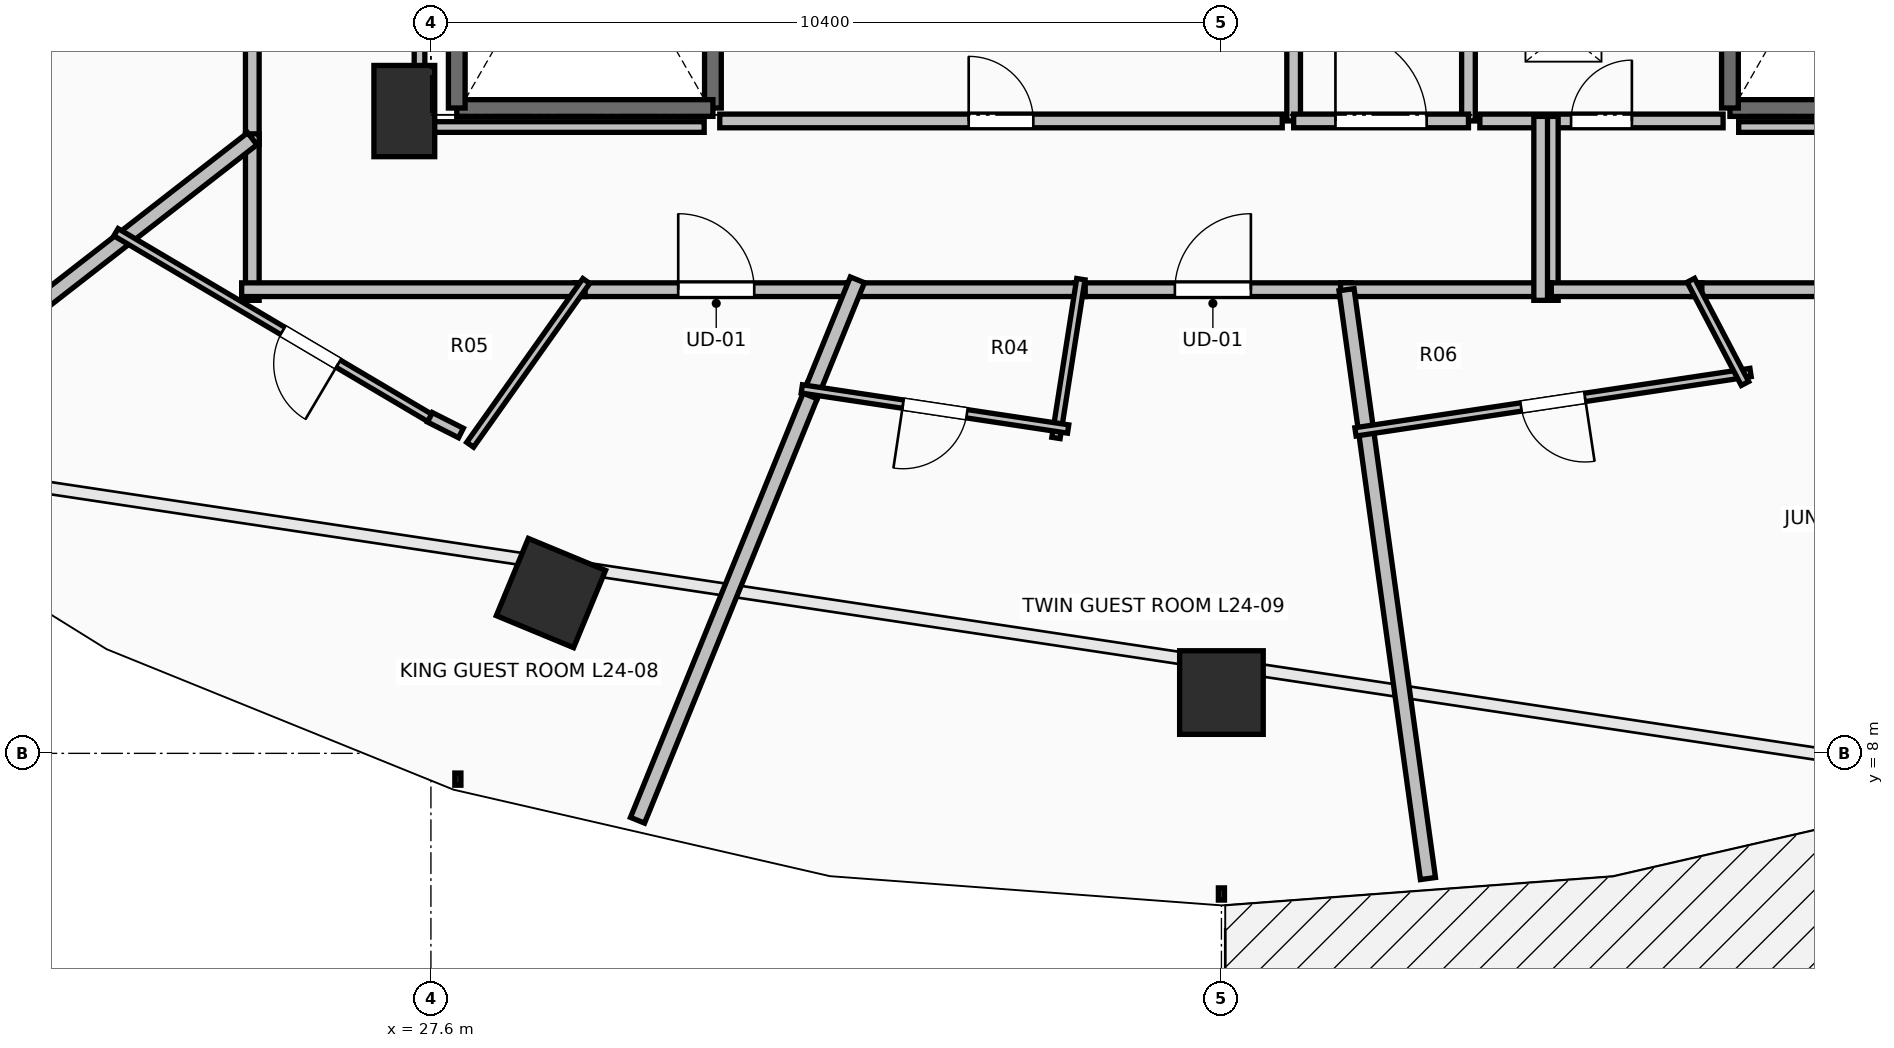
"""IFC4 building model, lengths in metres.
Left out: names, types, materials, properties, quantities, classifications, styles, units other than length and angle.
Written with IfcOpenShell. Run it as: python <this file> out.ifc"""

import sys

from ifc_helpers import new_model, si_unit, direction, frame, frame_2d, origin, origin_2d, place, context, subcontext, project, spatial, rectangle, extrude, element, fill, save


model = new_model("IFC4")
c1 = context("Model", 3, precision=1e-05, world=origin(), true_north=direction((0.0, 1.0)))
c2 = subcontext(c1, "Body", "Model", "MODEL_VIEW")
j1 = project(units=[si_unit("LENGTHUNIT", "METRE"), si_unit("PLANEANGLEUNIT", "RADIAN")], contexts=[c1])
p1 = place(None, origin())
s1 = spatial("IfcSite", under=j1, at=p1, CompositionType="ELEMENT")
p2 = place(p1, origin())
s2 = spatial("IfcBuilding", under=s1, at=p2, CompositionType="ELEMENT")
p3 = place(p2, frame((0.0, 0.0, 92.8)))
s3 = spatial("IfcBuildingStorey", under=s2, at=p3, CompositionType="ELEMENT", Elevation=92.8)
for number, where, z_axis, x_axis in (
    (1, (29.179, 10.109, 0.0), (0.0, 0.0, 1.0), (-0.383, -0.924, 0.0)),
    (2, (38.0, 8.8, 0.0), (0.0, 0.0, 1.0), (0.0, -1.0, 0.0)),
):
    element("IfcColumn", number, at=place(p3, frame(where, z_axis=z_axis, x_axis=x_axis)), inside=s3, PredefinedType="COLUMN", context=c2, shape_type="SweptSolid", body=[
        extrude(rectangle(XDim=1.1, YDim=1.1, at=origin_2d()), origin(), (0.0, 0.0, 1.0), 3.5),
    ])
p4 = place(p3, frame((27.25, 16.45, 0.0), z_axis=(0.0, 0.0, 1.0), x_axis=(1.0, 0.0, 0.0)))
e3 = element("IfcColumn", 3, at=p4, inside=s3, PredefinedType="PILASTER", context=c2, shape_type="SweptSolid", body=[
    extrude(rectangle(XDim=0.8, YDim=1.2, at=origin_2d()), origin(), (0.0, 0.0, 1.0), 3.5),
])
p5 = place(p3, frame((31.31, 23.91, 0.0), z_axis=(0.0, 0.0, 1.0), x_axis=(0.0, -1.0, 0.0)))
e4 = element("IfcWall", 4, at=p5, inside=s3, PredefinedType="SOLIDWALL", context=c2, shape_type="SweptSolid", body=[
    extrude(rectangle(XDim=7.42, YDim=0.22, at=frame_2d((3.71, 0.0))), origin(), (0.0, 0.0, 1.0), 3.24),
])
p6 = place(p3, frame((31.31, 16.49, 0.0), z_axis=(0.0, 0.0, 1.0), x_axis=(-1.0, 0.0, 0.0)))
e5 = element("IfcWall", 5, at=p6, inside=s3, PredefinedType="SOLIDWALL", context=c2, shape_type="SweptSolid", body=[
    extrude(rectangle(XDim=3.37, YDim=0.22, at=frame_2d((1.685, 0.0))), origin(), (0.0, 0.0, 1.0), 3.24),
])
p7 = place(p3, frame((27.94, 16.49, 0.0), z_axis=(0.0, 0.0, 1.0), x_axis=(0.0, 1.0, 0.0)))
e6 = element("IfcWall", 6, at=p7, inside=s3, PredefinedType="SOLIDWALL", context=c2, shape_type="SweptSolid", body=[
    extrude(rectangle(XDim=7.42, YDim=0.22, at=frame_2d((3.71, 0.0))), origin(), (0.0, 0.0, 1.0), 3.24),
])
p8 = place(p3, frame((48.06, 16.49, 0.0), z_axis=(0.0, 0.0, 1.0), x_axis=(-1.0, 0.0, 0.0)))
e7 = element("IfcWall", 7, at=p8, inside=s3, PredefinedType="SOLIDWALL", context=c2, shape_type="SweptSolid", body=[
    extrude(rectangle(XDim=3.37, YDim=0.22, at=frame_2d((1.685, 0.0))), origin(), (0.0, 0.0, 1.0), 3.24),
])
p9 = place(p3, frame((44.69, 16.49, 0.0), z_axis=(0.0, 0.0, 1.0), x_axis=(0.0, 1.0, 0.0)))
e8 = element("IfcWall", 8, at=p9, inside=s3, PredefinedType="SOLIDWALL", context=c2, shape_type="SweptSolid", body=[
    extrude(rectangle(XDim=7.42, YDim=0.22, at=frame_2d((3.71, 0.0))), origin(), (0.0, 0.0, 1.0), 3.24),
])
p10 = place(p3, frame((41.25, 16.32, 0.0), z_axis=(0.0, 0.0, 1.0), x_axis=(0.0, 1.0, 0.0)))
e9 = element("IfcWall", 9, at=p10, inside=s3, PredefinedType="PARTITIONING", context=c2, shape_type="SweptSolid", body=[
    extrude(rectangle(XDim=3.985, YDim=0.18, at=frame_2d((1.992, 0.0))), origin(), (0.0, 0.0, 1.0), 3.24),
])
p11 = place(p10, frame((1.593, 0.0, 0.0)))
e10 = element("IfcOpeningElement", 10, at=p11, cuts=e9, PredefinedType="OPENING", context=c2, shape_type="SweptSolid", body=[
    extrude(rectangle(XDim=0.8, YDim=2.05, at=frame_2d((0.4, 1.025))), frame((0.0, 0.105, 0.0), z_axis=(0.0, -1.0, 0.0), x_axis=(1.0, 0.0, 0.0)), (0.0, 0.0, 1.0), 0.21),
])
p12 = place(p3, frame((38.95, 21.755, 0.0), z_axis=(0.0, 0.0, 1.0), x_axis=(0.0, -1.0, 0.0)))
e11 = element("IfcWall", 11, at=p12, inside=s3, PredefinedType="PARTITIONING", context=c2, shape_type="SweptSolid", body=[
    extrude(rectangle(XDim=5.435, YDim=0.18, at=frame_2d((2.717, 0.0))), origin(), (0.0, 0.0, 1.0), 3.24),
])
p13 = place(p12, frame((2.292, 0.0, 0.0)))
e12 = element("IfcOpeningElement", 12, at=p13, cuts=e11, PredefinedType="OPENING", context=c2, shape_type="SweptSolid", body=[
    extrude(rectangle(XDim=0.85, YDim=2.1, at=frame_2d((0.425, 1.05))), frame((0.0, 0.105, 0.0), z_axis=(0.0, -1.0, 0.0), x_axis=(1.0, 0.0, 0.0)), (0.0, 0.0, 1.0), 0.21),
])
p14 = place(p3, frame((38.95, 16.32, 0.0), z_axis=(0.0, 0.0, 1.0), x_axis=(1.0, 0.0, 0.0)))
e13 = element("IfcWall", 13, at=p14, inside=s3, PredefinedType="PARTITIONING", context=c2, shape_type="SweptSolid", body=[
    extrude(rectangle(XDim=2.3, YDim=0.18, at=frame_2d((1.15, 0.0))), origin(), (0.0, 0.0, 1.0), 3.24),
])
p15 = place(p14, frame((0.55, 0.0, 0.0)))
e14 = element("IfcOpeningElement", 14, at=p15, cuts=e13, PredefinedType="OPENING", context=c2, shape_type="SweptSolid", body=[
    extrude(rectangle(XDim=1.2, YDim=2.15, at=frame_2d((0.6, 1.075))), frame((0.0, 0.105, 0.0), z_axis=(0.0, -1.0, 0.0), x_axis=(1.0, 0.0, 0.0)), (0.0, 0.0, 1.0), 0.21),
])
p16 = place(p3, frame((41.4, 16.32, 0.0), z_axis=(0.0, 0.0, 1.0), x_axis=(1.0, 0.0, 0.0)))
e15 = element("IfcWall", 15, at=p16, inside=s3, PredefinedType="PARTITIONING", context=c2, shape_type="SweptSolid", body=[
    extrude(rectangle(XDim=3.2, YDim=0.18, at=frame_2d((1.6, 0.0))), origin(), (0.0, 0.0, 1.0), 3.24),
])
p17 = place(p16, frame((1.2, 0.0, 0.0)))
e16 = element("IfcOpeningElement", 16, at=p17, cuts=e15, PredefinedType="OPENING", context=c2, shape_type="SweptSolid", body=[
    extrude(rectangle(XDim=0.8, YDim=2.05, at=frame_2d((0.4, 1.025))), frame((0.0, 0.105, 0.0), z_axis=(0.0, -1.0, 0.0), x_axis=(1.0, 0.0, 0.0)), (0.0, 0.0, 1.0), 0.21),
])
p18 = place(p3, frame((31.4, 16.32, 0.0), z_axis=(0.0, 0.0, 1.0), x_axis=(1.0, 0.0, 0.0)))
e17 = element("IfcWall", 17, at=p18, inside=s3, PredefinedType="PARTITIONING", context=c2, shape_type="SweptSolid", body=[
    extrude(rectangle(XDim=7.4, YDim=0.18, at=frame_2d((3.7, 0.0))), origin(), (0.0, 0.0, 1.0), 3.24),
])
p19 = place(p18, frame((3.275, 0.0, 0.0)))
e18 = element("IfcOpeningElement", 18, at=p19, cuts=e17, PredefinedType="OPENING", context=c2, shape_type="SweptSolid", body=[
    extrude(rectangle(XDim=0.85, YDim=2.1, at=frame_2d((0.425, 1.05))), frame((0.0, 0.105, 0.0), z_axis=(0.0, -1.0, 0.0), x_axis=(1.0, 0.0, 0.0)), (0.0, 0.0, 1.0), 0.21),
])
p20 = place(p3, frame((25.25, 21.147, 0.0), z_axis=(0.0, 0.0, 1.0), x_axis=(0.0, -1.0, 0.0)))
e19 = element("IfcWall", 19, at=p20, inside=s3, PredefinedType="PARTITIONING", context=c2, shape_type="SweptSolid", body=[
    extrude(rectangle(XDim=5.137, YDim=0.18, at=frame_2d((2.568, 0.0))), origin(), (0.0, 0.0, 1.0), 2.432),
])
p21 = place(p20, frame((2.043, 0.0, 0.0)))
e20 = element("IfcOpeningElement", 20, at=p21, cuts=e19, PredefinedType="OPENING", context=c2, shape_type="SweptSolid", body=[
    extrude(rectangle(XDim=1.05, YDim=2.2, at=frame_2d((0.525, 1.1))), frame((0.0, 0.105, 0.0), z_axis=(0.0, -1.0, 0.0), x_axis=(1.0, 0.0, 0.0)), (0.0, 0.0, 1.0), 0.21),
])
p22 = place(p3, frame((29.489, 14.1, 0.0), z_axis=(0.0, 0.0, 1.0), x_axis=(1.0, 0.0, 0.0)))
e21 = element("IfcWall", 21, at=p22, inside=s3, PredefinedType="PARTITIONING", context=c2, shape_type="SweptSolid", body=[
    extrude(rectangle(XDim=3.729, YDim=0.18, at=frame_2d((1.865, 0.0))), origin(), (0.0, 0.0, 1.0), 3.24),
])
p23 = place(p22, frame((1.365, 0.0, 0.0)))
e22 = element("IfcOpeningElement", 22, at=p23, cuts=e21, PredefinedType="OPENING", context=c2, shape_type="SweptSolid", body=[
    extrude(rectangle(XDim=1.0, YDim=2.15, at=frame_2d((0.5, 1.075))), frame((0.0, 0.105, 0.0), z_axis=(0.0, -1.0, 0.0), x_axis=(1.0, 0.0, 0.0)), (0.0, 0.0, 1.0), 0.21),
])
p24 = place(p3, frame((25.25, 16.15, 0.0), z_axis=(0.0, 0.0, 1.0), x_axis=(0.0, -1.0, 0.0)))
e23 = element("IfcWall", 23, at=p24, inside=s3, PredefinedType="PARTITIONING", context=c2, shape_type="SweptSolid", body=[
    extrude(rectangle(XDim=2.19, YDim=0.18, at=frame_2d((1.095, 0.0))), origin(), (0.0, 0.0, 1.0), 2.432),
])
p25 = place(p3, frame((25.11, 14.1, 0.0), z_axis=(0.0, 0.0, 1.0), x_axis=(1.0, 0.0, 0.0)))
e24 = element("IfcWall", 24, at=p25, inside=s3, PredefinedType="PARTITIONING", context=c2, shape_type="SweptSolid", body=[
    extrude(rectangle(XDim=4.519, YDim=0.18, at=frame_2d((2.259, 0.0))), origin(), (0.0, 0.0, 1.0), 2.432),
])
p26 = place(p3, frame((36.068, 14.1, 0.0), z_axis=(0.0, 0.0, 1.0), x_axis=(1.0, 0.0, 0.0)))
e25 = element("IfcWall", 25, at=p26, inside=s3, PredefinedType="PARTITIONING", context=c2, shape_type="SweptSolid", body=[
    extrude(rectangle(XDim=3.639, YDim=0.18, at=frame_2d((1.819, 0.0))), origin(), (0.0, 0.0, 1.0), 2.972),
])
p27 = place(p26, frame((1.32, 0.0, 0.0)))
e26 = element("IfcOpeningElement", 26, at=p27, cuts=e25, PredefinedType="OPENING", context=c2, shape_type="SweptSolid", body=[
    extrude(rectangle(XDim=1.0, YDim=2.15, at=frame_2d((0.5, 1.075))), frame((0.0, 0.105, 0.0), z_axis=(0.0, -1.0, 0.0), x_axis=(1.0, 0.0, 0.0)), (0.0, 0.0, 1.0), 0.21),
])
p28 = place(p3, frame((33.078, 14.1, 0.0), z_axis=(0.0, 0.0, 1.0), x_axis=(1.0, 0.0, 0.0)))
e27 = element("IfcWall", 27, at=p28, inside=s3, PredefinedType="PARTITIONING", context=c2, shape_type="SweptSolid", body=[
    extrude(rectangle(XDim=3.13, YDim=0.18, at=frame_2d((1.565, 0.0))), origin(), (0.0, 0.0, 1.0), 2.972),
])
p29 = place(p3, frame((44.181, 14.1, 0.0), z_axis=(0.0, 0.0, 1.0), x_axis=(1.0, 0.0, 0.0)))
e28 = element("IfcWall", 28, at=p29, inside=s3, PredefinedType="PARTITIONING", context=c2, shape_type="SweptSolid", body=[
    extrude(rectangle(XDim=6.569, YDim=0.18, at=frame_2d((3.285, 0.0))), origin(), (0.0, 0.0, 1.0), 2.432),
])
p30 = place(p29, frame((2.76, 0.0, 0.0)))
e29 = element("IfcOpeningElement", 29, at=p30, cuts=e28, PredefinedType="OPENING", context=c2, shape_type="SweptSolid", body=[
    extrude(rectangle(XDim=1.05, YDim=2.2, at=frame_2d((0.525, 1.1))), frame((0.0, 0.105, 0.0), z_axis=(0.0, -1.0, 0.0), x_axis=(1.0, 0.0, 0.0)), (0.0, 0.0, 1.0), 0.21),
])
p31 = place(p3, frame((42.34, 16.38, 0.0), z_axis=(0.0, 0.0, 1.0), x_axis=(0.0, -1.0, 0.0)))
e30 = element("IfcWall", 30, at=p31, inside=s3, PredefinedType="PARTITIONING", context=c2, shape_type="SweptSolid", body=[
    extrude(rectangle(XDim=2.42, YDim=0.18, at=frame_2d((1.21, 0.0))), origin(), (0.0, 0.0, 1.0), 2.972),
])
p32 = place(p3, frame((42.2, 14.1, 0.0), z_axis=(0.0, 0.0, 1.0), x_axis=(1.0, 0.0, 0.0)))
e31 = element("IfcWall", 31, at=p32, inside=s3, PredefinedType="PARTITIONING", context=c2, shape_type="SweptSolid", body=[
    extrude(rectangle(XDim=2.121, YDim=0.18, at=frame_2d((1.061, 0.0))), origin(), (0.0, 0.0, 1.0), 2.972),
])
p33 = place(p3, frame((39.567, 14.1, 0.0), z_axis=(0.0, 0.0, 1.0), x_axis=(1.0, 0.0, 0.0)))
e32 = element("IfcWall", 32, at=p33, inside=s3, PredefinedType="PARTITIONING", context=c2, shape_type="SweptSolid", body=[
    extrude(rectangle(XDim=2.773, YDim=0.18, at=frame_2d((1.387, 0.0))), origin(), (0.0, 0.0, 1.0), 2.972),
])
p34 = place(p3, frame((42.2, 13.96, 0.0), z_axis=(0.0, 0.0, 1.0), x_axis=(0.0, 1.0, 0.0)))
e33 = element("IfcWall", 33, at=p34, inside=s3, PredefinedType="PARTITIONING", context=c2, shape_type="SweptSolid", body=[
    extrude(rectangle(XDim=2.42, YDim=0.18, at=frame_2d((1.21, 0.0))), origin(), (0.0, 0.0, 1.0), 2.972),
])
p35 = place(p3, frame((19.725, 11.79, 0.0), z_axis=(0.0, 0.0, 1.0), x_axis=(0.789438616042, 0.613829513384, 0.0)))
e34 = element("IfcWall", 34, at=p35, inside=s3, PredefinedType="PARTITIONING", context=c2, shape_type="SweptSolid", body=[
    extrude(rectangle(XDim=6.999, YDim=0.2, at=frame_2d((3.499, 0.0))), origin(), (0.0, 0.0, 1.0), 2.432),
])
p36 = place(p3, frame((27.611, 12.399, 0.0), z_axis=(0.0, 0.0, 1.0), x_axis=(-0.860667615303, 0.509167218081, 0.0)))
e35 = element("IfcWall", 35, at=p36, inside=s3, PredefinedType="PARTITIONING", context=c2, shape_type="SweptSolid", body=[
    extrude(rectangle(XDim=4.827, YDim=0.11, at=frame_2d((2.413, 0.0))), origin(), (0.0, 0.0, 1.0), 2.432),
])
p37 = place(p36, frame((1.428, 0.0, 0.0)))
e36 = element("IfcOpeningElement", 36, at=p37, cuts=e35, PredefinedType="OPENING", context=c2, shape_type="SweptSolid", body=[
    extrude(rectangle(XDim=0.85, YDim=2.1, at=frame_2d((0.425, 1.05))), frame((0.0, 0.07, 0.0), z_axis=(0.0, -1.0, 0.0), x_axis=(1.0, 0.0, 0.0)), (0.0, 0.0, 1.0), 0.14),
])
p38 = place(p3, frame((29.644, 14.214, 0.0), z_axis=(0.0, 0.0, 1.0), x_axis=(-0.578550668744, -0.815646445279, 0.0)))
e37 = element("IfcWall", 37, at=p38, inside=s3, PredefinedType="PARTITIONING", context=c2, shape_type="SweptSolid", body=[
    extrude(rectangle(XDim=2.641, YDim=0.11, at=frame_2d((1.321, 0.0))), origin(), (0.0, 0.0, 1.0), 2.432),
])
p39 = place(p3, frame((30.318, 7.12, 0.0), z_axis=(0.0, 0.0, 1.0), x_axis=(0.376920780929, 0.926245499263, 0.0)))
e38 = element("IfcWall", 38, at=p39, inside=s3, PredefinedType="PARTITIONING", context=c2, shape_type="SweptSolid", body=[
    extrude(rectangle(XDim=6.166, YDim=0.2, at=frame_2d((3.083, 0.0))), origin(), (0.0, 0.0, 1.0), 2.677),
])
p40 = place(p3, frame((32.589, 12.701, 0.0), z_axis=(0.0, 0.0, 1.0), x_axis=(0.376742177728, 0.926318158907, 0.0)))
e39 = element("IfcWall", 39, at=p40, inside=s3, PredefinedType="PARTITIONING", context=c2, shape_type="SweptSolid", body=[
    extrude(rectangle(XDim=1.65, YDim=0.2, at=frame_2d((0.825, 0.0))), origin(), (0.0, 0.0, 1.0), 2.972),
])
p41 = place(p3, frame((36.151, 14.238, 0.0), z_axis=(0.0, 0.0, 1.0), x_axis=(-0.15485948048, -0.987936506718, 0.0)))
e40 = element("IfcWall", 40, at=p41, inside=s3, PredefinedType="PARTITIONING", context=c2, shape_type="SweptSolid", body=[
    extrude(rectangle(XDim=2.114, YDim=0.11, at=frame_2d((1.057, 0.0))), origin(), (0.0, 0.0, 1.0), 2.922),
])
p42 = place(p3, frame((35.983, 12.267, 0.0), z_axis=(0.0, 0.0, 1.0), x_axis=(-0.988843169739, 0.148960349288, 0.0)))
e41 = element("IfcWall", 41, at=p42, inside=s3, PredefinedType="PARTITIONING", context=c2, shape_type="SweptSolid", body=[
    extrude(rectangle(XDim=3.543, YDim=0.11, at=frame_2d((1.772, 0.0))), origin(), (0.0, 0.0, 1.0), 2.922),
])
p43 = place(p42, frame((1.347, 0.0, 0.0)))
e42 = element("IfcOpeningElement", 42, at=p43, cuts=e41, PredefinedType="OPENING", context=c2, shape_type="SweptSolid", body=[
    extrude(rectangle(XDim=0.85, YDim=2.1, at=frame_2d((0.425, 1.05))), frame((0.0, 0.07, 0.0), z_axis=(0.0, -1.0, 0.0), x_axis=(1.0, 0.0, 0.0)), (0.0, 0.0, 1.0), 0.14),
])
p44 = place(p3, frame((40.717, 6.353, 0.0), z_axis=(0.0, 0.0, 1.0), x_axis=(-0.136949014068, 0.990578097651, 0.0)))
e43 = element("IfcWall", 43, at=p44, inside=s3, PredefinedType="PARTITIONING", context=c2, shape_type="SweptSolid", body=[
    extrude(rectangle(XDim=7.821, YDim=0.2, at=frame_2d((3.91, 0.0))), origin(), (0.0, 0.0, 1.0), 2.432),
])
p45 = place(p3, frame((44.961, 13.011, 0.0), z_axis=(0.0, 0.0, 1.0), x_axis=(-0.98888518965, -0.148681141008, 0.0)))
e44 = element("IfcWall", 44, at=p45, inside=s3, PredefinedType="PARTITIONING", context=c2, shape_type="SweptSolid", body=[
    extrude(rectangle(XDim=5.256, YDim=0.11, at=frame_2d((2.628, 0.0))), origin(), (0.0, 0.0, 1.0), 2.432),
])
p46 = place(p45, frame((2.203, 0.0, 0.0)))
e45 = element("IfcOpeningElement", 45, at=p46, cuts=e44, PredefinedType="OPENING", context=c2, shape_type="SweptSolid", body=[
    extrude(rectangle(XDim=0.85, YDim=2.1, at=frame_2d((0.425, 1.05))), frame((0.0, 0.07, 0.0), z_axis=(0.0, -1.0, 0.0), x_axis=(1.0, 0.0, 0.0)), (0.0, 0.0, 1.0), 0.14),
])
p47 = place(p3, frame((44.176, 14.224, 0.0), z_axis=(0.0, 0.0, 1.0), x_axis=(0.464262791375, -0.885697499457, 0.0)))
e46 = element("IfcWall", 46, at=p47, inside=s3, PredefinedType="PARTITIONING", context=c2, shape_type="SweptSolid", body=[
    extrude(rectangle(XDim=1.533, YDim=0.11, at=frame_2d((0.767, 0.0))), origin(), (0.0, 0.0, 1.0), 2.432),
])
for number, where, z_axis, x_axis in (
    (47, (48.55, 16.24, 0.0), (0.0, 0.0, 1.0), (-1.0, 0.0, 0.0)),
    (48, (31.195, 16.24, 0.0), (0.0, 0.0, 1.0), (-1.0, 0.0, 0.0)),
):
    element("IfcWall", number, at=place(p3, frame(where, z_axis=z_axis, x_axis=x_axis)), inside=s3, PredefinedType="PARTITIONING", context=c2, shape_type="SweptSolid", body=[
        extrude(rectangle(XDim=3.745, YDim=0.14, at=frame_2d((1.873, 0.0))), origin(), (0.0, 0.0, 1.0), 2.432),
    ])
p48 = place(p3, frame((27.45, 16.24, 0.0), z_axis=(0.0, 0.0, 1.0), x_axis=(0.0, 1.0, 0.0)))
e49 = element("IfcWall", 49, at=p48, inside=s3, PredefinedType="PARTITIONING", context=c2, shape_type="SweptSolid", body=[
    extrude(rectangle(XDim=7.514, YDim=0.14, at=frame_2d((3.757, 0.0))), origin(), (0.0, 0.0, 1.0), 2.432),
])
p49 = place(p3, frame((27.587, 12.421, 0.0), z_axis=(0.0, 0.0, 1.0), x_axis=(0.892279780373, -0.451482882884, 0.0)))
e50 = element("IfcWall", 50, at=p49, inside=s3, PredefinedType="PARTITIONING", context=c2, shape_type="SweptSolid", body=[
    extrude(rectangle(XDim=0.457, YDim=0.14, at=frame_2d((0.229, 0.0))), origin(), (0.0, 0.0, 1.0), 3.24),
])
p50 = place(p15, origin())
e51 = element("IfcDoor", 51, at=p50, inside=s3, OperationType="SINGLE_SWING_LEFT", PredefinedType="DOOR", context=c2, shape_type="SweptSolid", body=[
    extrude(rectangle(XDim=1.2, YDim=2.15, at=frame_2d((0.6, 1.075))), frame((0.0, 0.025, 0.0), z_axis=(0.0, -1.0, 0.0), x_axis=(1.0, 0.0, 0.0)), (0.0, 0.0, 1.0), 0.05),
])
fill(e14, e51)
p51 = place(p17, origin())
e52 = element("IfcDoor", 52, at=p51, inside=s3, OperationType="SINGLE_SWING_RIGHT", PredefinedType="DOOR", context=c2, shape_type="SweptSolid", body=[
    extrude(rectangle(XDim=0.8, YDim=2.05, at=frame_2d((0.4, 1.025))), frame((0.0, 0.025, 0.0), z_axis=(0.0, -1.0, 0.0), x_axis=(1.0, 0.0, 0.0)), (0.0, 0.0, 1.0), 0.05),
])
fill(e16, e52)
p52 = place(p19, origin())
e53 = element("IfcDoor", 53, at=p52, inside=s3, OperationType="SINGLE_SWING_LEFT", PredefinedType="DOOR", context=c2, shape_type="SweptSolid", body=[
    extrude(rectangle(XDim=0.85, YDim=2.1, at=frame_2d((0.425, 1.05))), frame((0.0, 0.025, 0.0), z_axis=(0.0, -1.0, 0.0), x_axis=(1.0, 0.0, 0.0)), (0.0, 0.0, 1.0), 0.05),
])
fill(e18, e53)
p53 = place(p23, origin())
e54 = element("IfcDoor", 54, at=p53, inside=s3, OperationType="SINGLE_SWING_LEFT", PredefinedType="DOOR", context=c2, shape_type="SweptSolid", body=[
    extrude(rectangle(XDim=1.0, YDim=2.15, at=frame_2d((0.5, 1.075))), frame((0.0, 0.025, 0.0), z_axis=(0.0, -1.0, 0.0), x_axis=(1.0, 0.0, 0.0)), (0.0, 0.0, 1.0), 0.05),
])
fill(e22, e54)
p54 = place(p27, origin())
e55 = element("IfcDoor", 55, at=p54, inside=s3, OperationType="SINGLE_SWING_RIGHT", PredefinedType="DOOR", context=c2, shape_type="SweptSolid", body=[
    extrude(rectangle(XDim=1.0, YDim=2.15, at=frame_2d((0.5, 1.075))), frame((0.0, 0.025, 0.0), z_axis=(0.0, -1.0, 0.0), x_axis=(1.0, 0.0, 0.0)), (0.0, 0.0, 1.0), 0.05),
])
fill(e26, e55)
p55 = place(p37, origin())
e56 = element("IfcDoor", 56, at=p55, inside=s3, OperationType="SINGLE_SWING_LEFT", PredefinedType="DOOR", context=c2, shape_type="SweptSolid", body=[
    extrude(rectangle(XDim=0.85, YDim=2.1, at=frame_2d((0.425, 1.05))), frame((0.0, 0.025, 0.0), z_axis=(0.0, -1.0, 0.0), x_axis=(1.0, 0.0, 0.0)), (0.0, 0.0, 1.0), 0.05),
])
fill(e36, e56)
p56 = place(p43, origin())
e57 = element("IfcDoor", 57, at=p56, inside=s3, OperationType="SINGLE_SWING_RIGHT", PredefinedType="DOOR", context=c2, shape_type="SweptSolid", body=[
    extrude(rectangle(XDim=0.85, YDim=2.1, at=frame_2d((0.425, 1.05))), frame((0.0, 0.025, 0.0), z_axis=(0.0, -1.0, 0.0), x_axis=(1.0, 0.0, 0.0)), (0.0, 0.0, 1.0), 0.05),
])
fill(e42, e57)
p57 = place(p46, origin())
e58 = element("IfcDoor", 58, at=p57, inside=s3, OperationType="SINGLE_SWING_LEFT", PredefinedType="DOOR", context=c2, shape_type="SweptSolid", body=[
    extrude(rectangle(XDim=0.85, YDim=2.1, at=frame_2d((0.425, 1.05))), frame((0.0, 0.025, 0.0), z_axis=(0.0, -1.0, 0.0), x_axis=(1.0, 0.0, 0.0)), (0.0, 0.0, 1.0), 0.05),
])
fill(e45, e58)
save(model, sys.argv[1])
